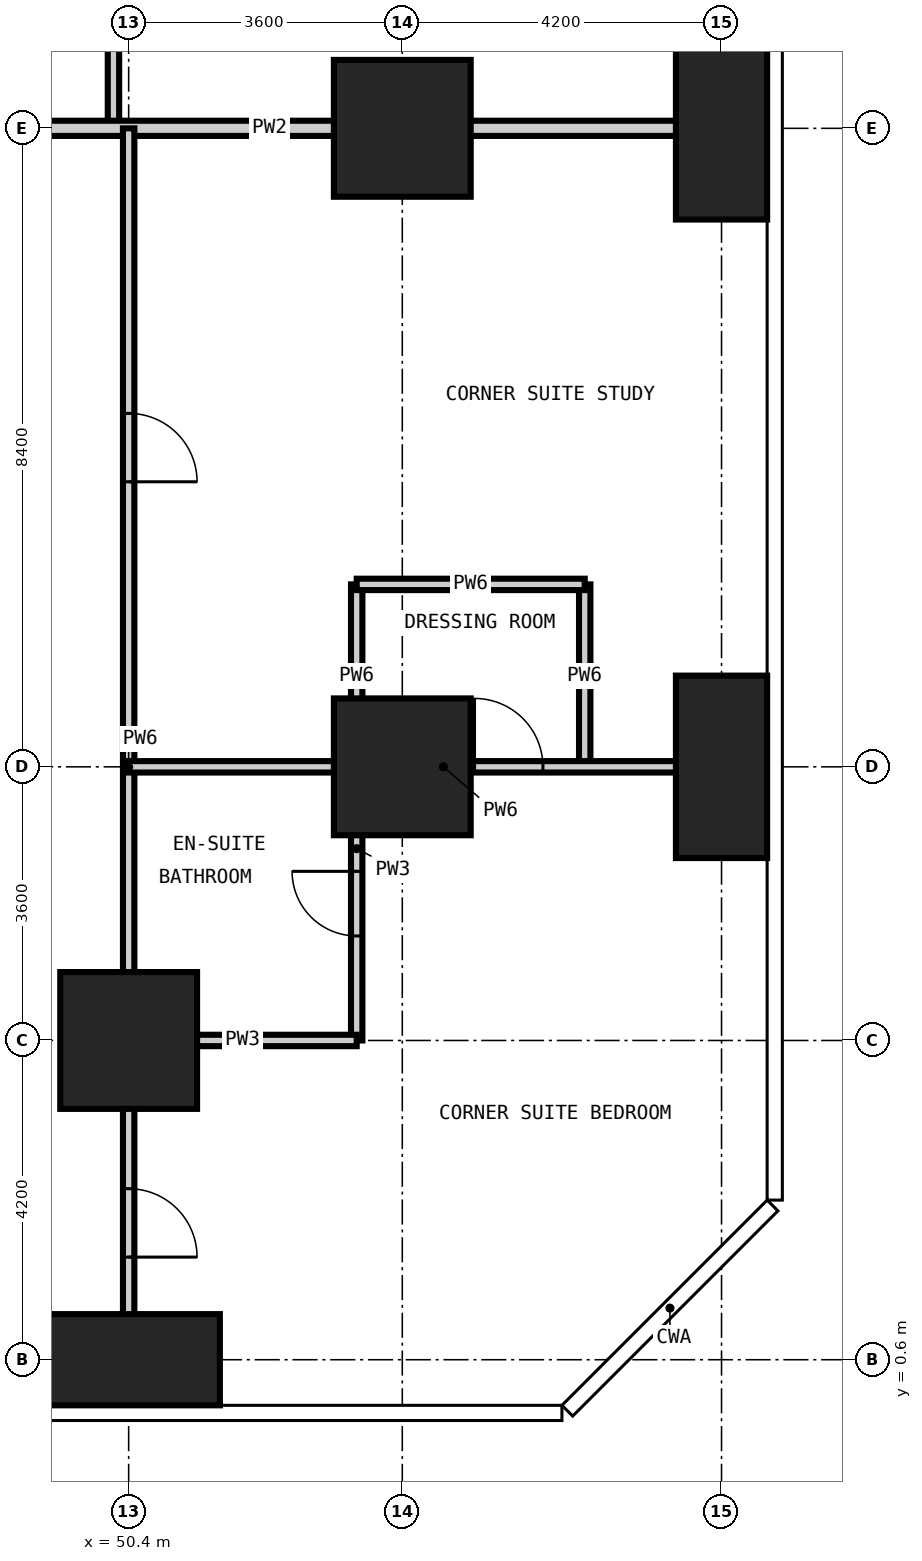
"""IFC4 building model, lengths in metres.
Left out: names, types, materials, properties, quantities, classifications, styles, units other than length and angle.
Written with IfcOpenShell. Run it as: python <this file> out.ifc"""

import sys

from ifc_helpers import new_model, si_unit, direction, frame, frame_2d, origin, origin_2d, place, context, subcontext, project, spatial, rectangle, extrude, element, fill, save


model = new_model("IFC4")
c1 = context("Model", 3, precision=1e-05, world=origin(), true_north=direction((0.0, 1.0)))
c2 = subcontext(c1, "Body", "Model", "MODEL_VIEW")
j1 = project(units=[si_unit("LENGTHUNIT", "METRE"), si_unit("PLANEANGLEUNIT", "RADIAN")], contexts=[c1])
p1 = place(None, origin())
s1 = spatial("IfcSite", under=j1, at=p1, CompositionType="ELEMENT")
p2 = place(p1, origin())
s2 = spatial("IfcBuilding", under=s1, at=p2, CompositionType="ELEMENT")
p3 = place(p2, frame((0.0, 0.0, 27.0)))
s3 = spatial("IfcBuildingStorey", under=s2, at=p3, CompositionType="ELEMENT", Elevation=27.0)
p4 = place(p3, frame((50.4, 0.6, -0.35), z_axis=(0.0, 0.0, 1.0), x_axis=(1.0, 0.0, 0.0)))
e1 = element("IfcColumn", 1, at=p4, inside=s3, PredefinedType="COLUMN", context=c2, shape_type="SweptSolid", body=[
    extrude(rectangle(XDim=2.4, YDim=1.2, at=origin_2d()), origin(), (0.0, 0.0, 1.0), 3.6),
])
for number, where, z_axis, x_axis in (
    (2, (50.4, 4.8, -0.35), (0.0, 0.0, 1.0), (1.0, 0.0, 0.0)),
    (3, (54.0, 8.4, -0.35), (0.0, 0.0, 1.0), (1.0, 0.0, 0.0)),
    (4, (54.0, 16.8, -0.35), (0.0, 0.0, 1.0), (1.0, 0.0, 0.0)),
):
    element("IfcColumn", number, at=place(p3, frame(where, z_axis=z_axis, x_axis=x_axis)), inside=s3, PredefinedType="COLUMN", context=c2, shape_type="SweptSolid", body=[
        extrude(rectangle(XDim=1.8, YDim=1.8, at=origin_2d()), origin(), (0.0, 0.0, 1.0), 3.6),
    ])
for number, where, z_axis, x_axis in (
    (5, (58.2, 8.4, -0.35), (0.0, 0.0, 1.0), (1.0, 0.0, 0.0)),
    (6, (58.2, 16.8, -0.35), (0.0, 0.0, 1.0), (1.0, 0.0, 0.0)),
):
    element("IfcColumn", number, at=place(p3, frame(where, z_axis=z_axis, x_axis=x_axis)), inside=s3, PredefinedType="COLUMN", context=c2, shape_type="SweptSolid", body=[
        extrude(rectangle(XDim=1.2, YDim=2.4, at=origin_2d()), origin(), (0.0, 0.0, 1.0), 3.6),
    ])
p5 = place(p3, frame((50.2, 16.8, 0.0), z_axis=(0.0, 0.0, 1.0), x_axis=(0.0, 1.0, 0.0)))
e7 = element("IfcWall", 7, at=p5, inside=s3, PredefinedType="PARTITIONING", context=c2, shape_type="SweptSolid", body=[
    extrude(rectangle(XDim=2.7, YDim=0.15, at=frame_2d((1.35, 0.0))), origin(), (0.0, 0.0, 1.0), 3.25),
])
p6 = place(p3, frame((53.4, 4.8, 0.0), z_axis=(0.0, 0.0, 1.0), x_axis=(0.0, 1.0, 0.0)))
e8 = element("IfcWall", 8, at=p6, inside=s3, PredefinedType="PARTITIONING", context=c2, shape_type="SweptSolid", body=[
    extrude(rectangle(XDim=3.6, YDim=0.15, at=frame_2d((1.8, 0.0))), origin(), (0.0, 0.0, 1.0), 3.25),
])
p7 = place(p6, frame((1.375, 0.0, 0.0)))
e9 = element("IfcOpeningElement", 9, at=p7, cuts=e8, PredefinedType="OPENING", context=c2, shape_type="SweptSolid", body=[
    extrude(rectangle(XDim=0.85, YDim=2.1, at=frame_2d((0.425, 1.05))), frame((0.0, 0.085, 0.0), z_axis=(0.0, -1.0, 0.0), x_axis=(1.0, 0.0, 0.0)), (0.0, 0.0, 1.0), 0.17),
])
p8 = place(p3, frame((50.4, 4.8, 0.0), z_axis=(0.0, 0.0, 1.0), x_axis=(1.0, 0.0, 0.0)))
e10 = element("IfcWall", 10, at=p8, inside=s3, PredefinedType="PARTITIONING", context=c2, shape_type="SweptSolid", body=[
    extrude(rectangle(XDim=3.0, YDim=0.15, at=frame_2d((1.5, 0.0))), origin(), (0.0, 0.0, 1.0), 3.25),
])
p9 = place(p3, frame((45.7, 16.8, 0.0), z_axis=(0.0, 0.0, 1.0), x_axis=(1.0, 0.0, 0.0)))
e11 = element("IfcWall", 11, at=p9, inside=s3, PredefinedType="PARTITIONING", context=c2, shape_type="SweptSolid", body=[
    extrude(rectangle(XDim=13.108, YDim=0.2, at=frame_2d((6.554, 0.0))), origin(), (0.0, 0.0, 1.0), 3.25),
])
p10 = place(p3, frame((50.4, -0.008, 0.0), z_axis=(0.0, 0.0, 1.0), x_axis=(0.0, 1.0, 0.0)))
e12 = element("IfcWall", 12, at=p10, inside=s3, PredefinedType="PARTITIONING", context=c2, shape_type="SweptSolid", body=[
    extrude(rectangle(XDim=16.808, YDim=0.15, at=frame_2d((8.404, 0.0))), origin(), (0.0, 0.0, 1.0), 3.25),
])
p11 = place(p10, frame((1.958, 0.0, 0.0)))
e13 = element("IfcOpeningElement", 13, at=p11, cuts=e12, PredefinedType="OPENING", context=c2, shape_type="SweptSolid", body=[
    extrude(rectangle(XDim=0.9, YDim=2.1, at=frame_2d((0.45, 1.05))), frame((0.0, 0.085, 0.0), z_axis=(0.0, -1.0, 0.0), x_axis=(1.0, 0.0, 0.0)), (0.0, 0.0, 1.0), 0.17),
])
p12 = place(p10, frame((12.158, 0.0, 0.0)))
e14 = element("IfcOpeningElement", 14, at=p12, cuts=e12, PredefinedType="OPENING", context=c2, shape_type="SweptSolid", body=[
    extrude(rectangle(XDim=0.9, YDim=2.1, at=frame_2d((0.45, 1.05))), frame((0.0, 0.085, 0.0), z_axis=(0.0, -1.0, 0.0), x_axis=(1.0, 0.0, 0.0)), (0.0, 0.0, 1.0), 0.17),
])
for number, where, z_axis, x_axis in (
    (15, (53.4, 8.4, 0.0), (0.0, 0.0, 1.0), (0.0, 1.0, 0.0)),
    (16, (56.4, 8.4, 0.0), (0.0, 0.0, 1.0), (0.0, 1.0, 0.0)),
):
    element("IfcWall", number, at=place(p3, frame(where, z_axis=z_axis, x_axis=x_axis)), inside=s3, PredefinedType="PARTITIONING", context=c2, shape_type="SweptSolid", body=[
        extrude(rectangle(XDim=2.4, YDim=0.15, at=frame_2d((1.2, 0.0))), origin(), (0.0, 0.0, 1.0), 3.25),
    ])
p13 = place(p3, frame((50.4, 8.4, 0.0), z_axis=(0.0, 0.0, 1.0), x_axis=(1.0, 0.0, 0.0)))
e17 = element("IfcWall", 17, at=p13, inside=s3, PredefinedType="PARTITIONING", context=c2, shape_type="SweptSolid", body=[
    extrude(rectangle(XDim=8.408, YDim=0.15, at=frame_2d((4.204, 0.0))), origin(), (0.0, 0.0, 1.0), 3.25),
])
p14 = place(p13, frame((4.55, 0.0, 0.0)))
e18 = element("IfcOpeningElement", 18, at=p14, cuts=e17, PredefinedType="OPENING", context=c2, shape_type="SweptSolid", body=[
    extrude(rectangle(XDim=0.9, YDim=2.1, at=frame_2d((0.45, 1.05))), frame((0.0, 0.085, 0.0), z_axis=(0.0, -1.0, 0.0), x_axis=(1.0, 0.0, 0.0)), (0.0, 0.0, 1.0), 0.17),
])
p15 = place(p3, frame((53.4, 10.8, 0.0), z_axis=(0.0, 0.0, 1.0), x_axis=(1.0, 0.0, 0.0)))
e19 = element("IfcWall", 19, at=p15, inside=s3, PredefinedType="PARTITIONING", context=c2, shape_type="SweptSolid", body=[
    extrude(rectangle(XDim=3.0, YDim=0.15, at=frame_2d((1.5, 0.0))), origin(), (0.0, 0.0, 1.0), 3.25),
])
p16 = place(p11, frame((0.9, 0.0, 0.0), z_axis=(0.0, 0.0, 1.0), x_axis=(-1.0, 0.0, 0.0)))
e20 = element("IfcDoor", 20, at=p16, inside=s3, OperationType="SINGLE_SWING_RIGHT", PredefinedType="DOOR", context=c2, shape_type="SweptSolid", body=[
    extrude(rectangle(XDim=0.9, YDim=2.1, at=frame_2d((0.45, 1.05))), frame((0.0, 0.025, 0.0), z_axis=(0.0, -1.0, 0.0), x_axis=(1.0, 0.0, 0.0)), (0.0, 0.0, 1.0), 0.05),
])
fill(e13, e20)
p17 = place(p7, origin())
e21 = element("IfcDoor", 21, at=p17, inside=s3, OperationType="SINGLE_SWING_RIGHT", PredefinedType="DOOR", context=c2, shape_type="SweptSolid", body=[
    extrude(rectangle(XDim=0.85, YDim=2.1, at=frame_2d((0.425, 1.05))), frame((0.0, 0.025, 0.0), z_axis=(0.0, -1.0, 0.0), x_axis=(1.0, 0.0, 0.0)), (0.0, 0.0, 1.0), 0.05),
])
fill(e9, e21)
p18 = place(p14, origin())
e22 = element("IfcDoor", 22, at=p18, inside=s3, OperationType="SINGLE_SWING_LEFT", PredefinedType="DOOR", context=c2, shape_type="SweptSolid", body=[
    extrude(rectangle(XDim=0.9, YDim=2.1, at=frame_2d((0.45, 1.05))), frame((0.0, 0.025, 0.0), z_axis=(0.0, -1.0, 0.0), x_axis=(1.0, 0.0, 0.0)), (0.0, 0.0, 1.0), 0.05),
])
fill(e18, e22)
p19 = place(p12, frame((0.9, 0.0, 0.0), z_axis=(0.0, 0.0, 1.0), x_axis=(-1.0, 0.0, 0.0)))
e23 = element("IfcDoor", 23, at=p19, inside=s3, OperationType="SINGLE_SWING_RIGHT", PredefinedType="DOOR", context=c2, shape_type="SweptSolid", body=[
    extrude(rectangle(XDim=0.9, YDim=2.1, at=frame_2d((0.45, 1.05))), frame((0.0, 0.025, 0.0), z_axis=(0.0, -1.0, 0.0), x_axis=(1.0, 0.0, 0.0)), (0.0, 0.0, 1.0), 0.05),
])
fill(e14, e23)
save(model, sys.argv[1])
